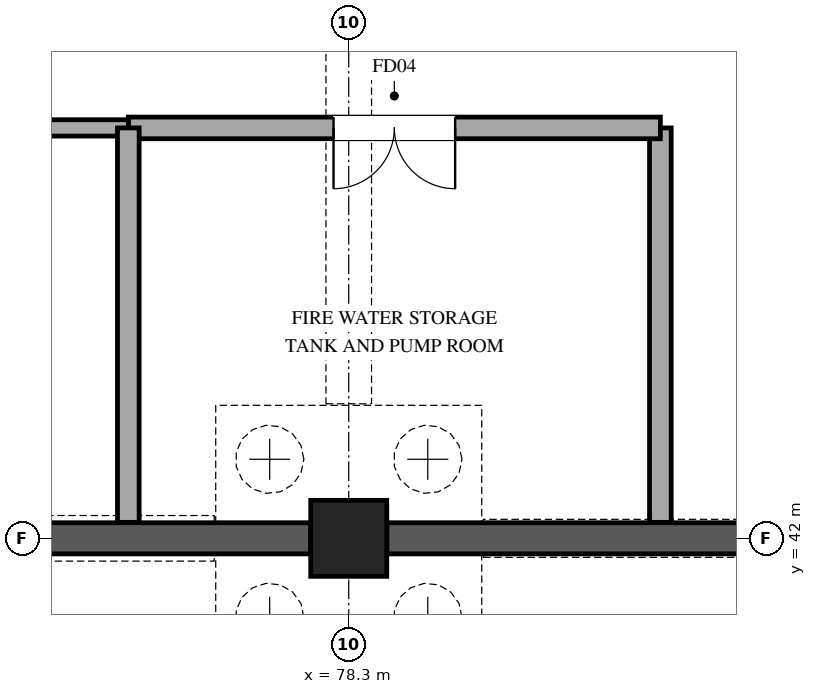
"""IFC4 building model, lengths in metres.
Left out: names, types, materials, properties, quantities, classifications, styles, units other than length and angle.
Written with IfcOpenShell. Run it as: python <this file> out.ifc"""

import sys

from ifc_helpers import new_model, si_unit, direction, frame, frame_2d, origin, origin_2d, place, context, subcontext, project, spatial, rectangle, extrude, element, fill, save


model = new_model("IFC4")
c1 = context("Model", 3, precision=1e-05, world=origin(), true_north=direction((0.0, 1.0)))
c2 = subcontext(c1, "Body", "Model", "MODEL_VIEW")
j1 = project(units=[si_unit("LENGTHUNIT", "METRE"), si_unit("PLANEANGLEUNIT", "RADIAN")], contexts=[c1])
p1 = place(None, origin())
s1 = spatial("IfcSite", under=j1, at=p1, CompositionType="ELEMENT")
p2 = place(p1, origin())
s2 = spatial("IfcBuilding", under=s1, at=p2, CompositionType="ELEMENT")
p3 = place(p2, frame((0.0, 0.0, -9.6)))
s3 = spatial("IfcBuildingStorey", under=s2, at=p3, CompositionType="ELEMENT", Elevation=-9.6)
p4 = place(p3, frame((78.3, 42.0, 0.0), z_axis=(0.0, 0.0, 1.0), x_axis=(1.0, 0.0, 0.0)))
e1 = element("IfcColumn", 1, at=p4, inside=s3, PredefinedType="COLUMN", context=c2, shape_type="SweptSolid", body=[
    extrude(rectangle(XDim=1.0, YDim=1.0, at=origin_2d()), origin(), (0.0, 0.0, 1.0), 4.8),
])
for number, where, z_axis, x_axis in (
    (2, (86.498, 42.0, 0.0), (0.0, 0.0, 1.0), (-1.0, 0.0, 0.0)),
    (3, (77.798, 42.0, 0.0), (0.0, 0.0, 1.0), (-1.0, 0.0, 0.0)),
):
    element("IfcWall", number, at=place(p3, frame(where, z_axis=z_axis, x_axis=x_axis)), inside=s3, PredefinedType="USERDEFINED", context=c2, shape_type="SweptSolid", body=[
        extrude(rectangle(XDim=7.696, YDim=0.41, at=frame_2d((3.848, 0.0))), origin(), (0.0, 0.0, 1.0), 4.48),
    ])
p5 = place(p3, frame((82.4, 42.21, 0.0), z_axis=(0.0, 0.0, 1.0), x_axis=(0.0, 1.0, 0.0)))
e4 = element("IfcWall", 4, at=p5, inside=s3, PredefinedType="STANDARD", context=c2, shape_type="SweptSolid", body=[
    extrude(rectangle(XDim=5.19, YDim=0.285, at=frame_2d((2.595, 0.0))), origin(), (0.0, 0.0, 1.0), 3.82),
])
p6 = place(p3, frame((82.4, 47.4, 0.0), z_axis=(0.0, 0.0, 1.0), x_axis=(-1.0, 0.0, 0.0)))
e5 = element("IfcWall", 5, at=p6, inside=s3, PredefinedType="STANDARD", context=c2, shape_type="SweptSolid", body=[
    extrude(rectangle(XDim=7.0, YDim=0.285, at=frame_2d((3.5, 0.0))), origin(), (0.0, 0.0, 1.0), 3.67),
])
p7 = place(p6, frame((2.7, 0.0, 0.0)))
e6 = element("IfcOpeningElement", 6, at=p7, cuts=e5, PredefinedType="OPENING", context=c2, shape_type="SweptSolid", body=[
    extrude(rectangle(XDim=1.6, YDim=2.25, at=frame_2d((0.8, 1.125))), frame((0.0, 0.152, 0.0), z_axis=(0.0, -1.0, 0.0), x_axis=(1.0, 0.0, 0.0)), (0.0, 0.0, 1.0), 0.305),
])
p8 = place(p3, frame((75.4, 47.4, 0.0), z_axis=(0.0, 0.0, 1.0), x_axis=(-1.0, 0.0, 0.0)))
e7 = element("IfcWall", 7, at=p8, inside=s3, PredefinedType="PARTITIONING", context=c2, shape_type="SweptSolid", body=[
    extrude(rectangle(XDim=15.2, YDim=0.215, at=frame_2d((7.6, 0.0))), origin(), (0.0, 0.0, 1.0), 3.67),
])
p9 = place(p8, frame((6.925, 0.0, 0.0)))
e8 = element("IfcOpeningElement", 8, at=p9, cuts=e7, PredefinedType="OPENING", context=c2, shape_type="SweptSolid", body=[
    extrude(rectangle(XDim=1.35, YDim=2.2, at=frame_2d((0.675, 1.1))), frame((0.0, 0.118, 0.0), z_axis=(0.0, -1.0, 0.0), x_axis=(1.0, 0.0, 0.0)), (0.0, 0.0, 1.0), 0.235),
])
p10 = place(p3, frame((75.4, 42.21, 0.0), z_axis=(0.0, 0.0, 1.0), x_axis=(0.0, 1.0, 0.0)))
e9 = element("IfcWall", 9, at=p10, inside=s3, PredefinedType="STANDARD", context=c2, shape_type="SweptSolid", body=[
    extrude(rectangle(XDim=5.19, YDim=0.285, at=frame_2d((2.595, 0.0))), origin(), (0.0, 0.0, 1.0), 3.82),
])
p11 = place(p7, origin())
e10 = element("IfcDoor", 10, at=p11, inside=s3, OperationType="DOUBLE_DOOR_SINGLE_SWING", PredefinedType="DOOR", context=c2, shape_type="SweptSolid", body=[
    extrude(rectangle(XDim=1.6, YDim=2.25, at=frame_2d((0.8, 1.125))), frame((0.0, 0.025, 0.0), z_axis=(0.0, -1.0, 0.0), x_axis=(1.0, 0.0, 0.0)), (0.0, 0.0, 1.0), 0.05),
])
fill(e6, e10)
save(model, sys.argv[1])
